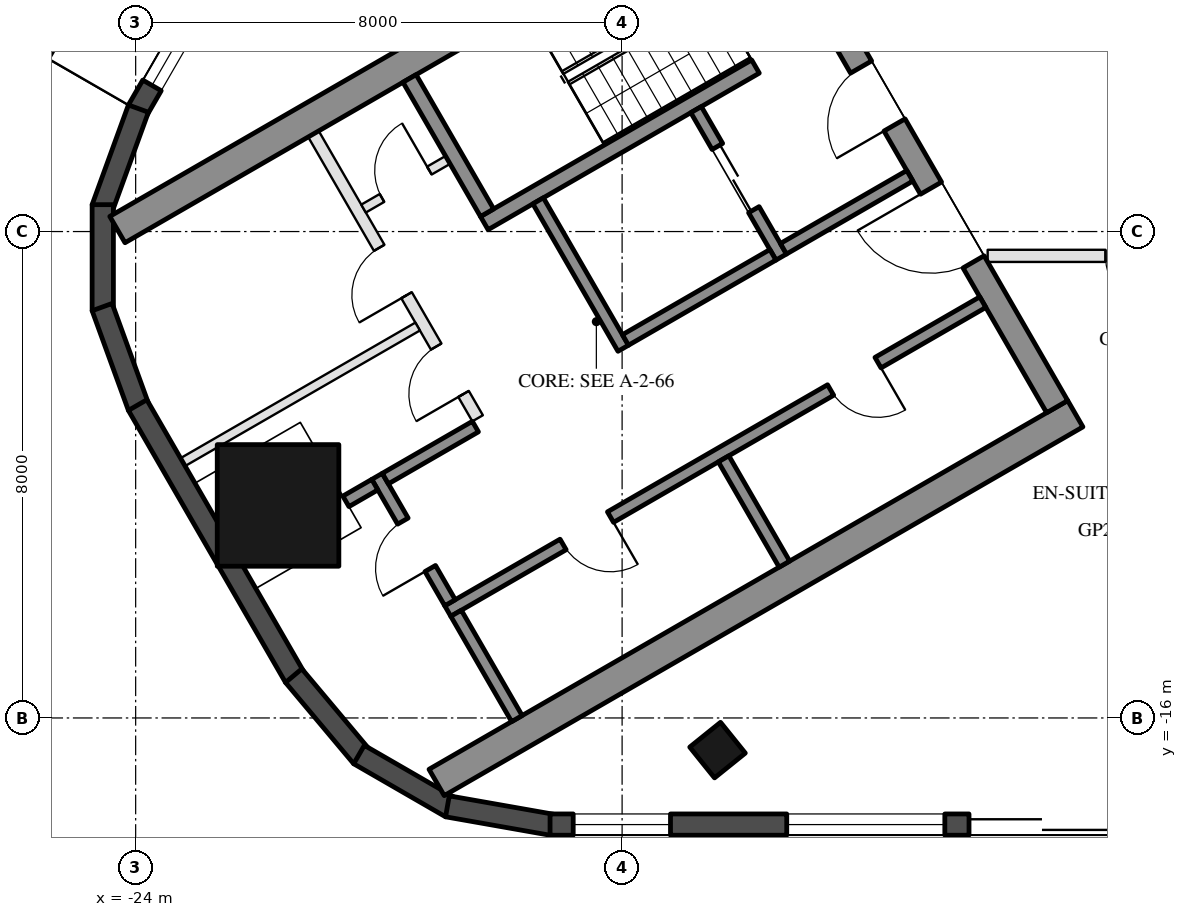
"""IFC4 building model, lengths in metres.
Left out: names, types, materials, properties, quantities, classifications, styles, units other than length and angle.
Written with IfcOpenShell. Run it as: python <this file> out.ifc"""

import sys

from ifc_helpers import new_model, si_unit, direction, frame, frame_2d, origin, origin_2d, place, context, subcontext, project, spatial, rectangle, hollow_rectangle, extrude, boolean, halfspace, element, fill, save


model = new_model("IFC4")
c1 = context("Model", 3, precision=1e-05, world=origin(), true_north=direction((0.0, 1.0)))
c2 = subcontext(c1, "Body", "Model", "MODEL_VIEW")
j1 = project(units=[si_unit("LENGTHUNIT", "METRE"), si_unit("PLANEANGLEUNIT", "RADIAN")], contexts=[c1])
p1 = place(None, origin())
s1 = spatial("IfcSite", under=j1, at=p1, CompositionType="ELEMENT")
p2 = place(p1, origin())
s2 = spatial("IfcBuilding", under=s1, at=p2, CompositionType="ELEMENT")
p3 = place(p2, frame((0.0, 0.0, 287.4)))
s3 = spatial("IfcBuildingStorey", under=s2, at=p3, CompositionType="ELEMENT", Elevation=287.4)
p4 = place(p3, frame((-14.431, -16.529, 0.0), z_axis=(0.121062211455, 0.150389046636, 0.981186565139), x_axis=(-0.992602517882, 0.00920416117, 0.121060005413)))
e1 = element("IfcColumn", 1, at=p4, inside=s3, PredefinedType="COLUMN", context=c2, shape_type="SweptSolid", body=[
    boolean("DIFFERENCE", boolean("DIFFERENCE", extrude(hollow_rectangle(XDim=0.65, YDim=0.65, WallThickness=0.03, at=origin_2d()), origin(), (0.0, 0.0, 1.0), 3.771), halfspace(frame((0.0, 0.0, 0.047), z_axis=(0.0, 0.0, 1.0), x_axis=(1.0, 0.0, 0.0)), True)), halfspace(frame((0.0, 0.0, 3.724), z_axis=(0.0, 0.0, 1.0), x_axis=(1.0, 0.0, 0.0)), False)),
])
p5 = place(p3, frame((-21.658, -12.504, 0.0), z_axis=(0.19033286006, 0.109938628672, 0.975544412268), x_axis=(-0.500170259217, 0.865927082262, 0.0)))
e2 = element("IfcColumn", 2, at=p5, inside=s3, PredefinedType="COLUMN", context=c2, shape_type="SweptSolid", body=[
    boolean("DIFFERENCE", boolean("DIFFERENCE", extrude(hollow_rectangle(XDim=2.0, YDim=2.0, WallThickness=0.05, at=origin_2d()), origin(), (0.0, 0.0, 1.0), 3.793), halfspace(frame((0.0, 0.0, 0.113), z_axis=(0.0, 0.0, 1.0), x_axis=(1.0, 0.0, 0.0)), True)), halfspace(frame((0.0, 0.0, 3.68), z_axis=(0.0, 0.0, 1.0), x_axis=(1.0, 0.0, 0.0)), False)),
])
p6 = place(p3, frame((-22.14, -2.841, 0.0), z_axis=(0.0, 0.0, 1.0), x_axis=(-0.500040506767, -0.866002015928, 0.0)))
e3 = element("IfcWall", 3, at=p6, inside=s3, PredefinedType="SOLIDWALL", context=c2, shape_type="SweptSolid", body=[
    extrude(rectangle(XDim=3.655, YDim=0.35, at=frame_2d((1.827, 0.0))), origin(), (0.0, 0.0, 1.0), 3.55),
])
p7 = place(p6, frame((1.582, 0.0, 0.3)))
e4 = element("IfcOpeningElement", 4, at=p7, cuts=e3, PredefinedType="OPENING", context=c2, shape_type="SweptSolid", body=[
    extrude(rectangle(XDim=1.6, YDim=2.65, at=frame_2d((0.8, 1.325))), frame((0.0, 0.185, 0.0), z_axis=(0.0, -1.0, 0.0), x_axis=(1.0, 0.0, 0.0)), (0.0, 0.0, 1.0), 0.37),
])
for number, where, z_axis, x_axis in (
    (5, (-23.955, -5.978, 0.0), (0.0, 0.0, 1.0), (-0.342, -0.94, 0.0)),
    (6, (-24.541, -7.558, 0.0), (0.0, 0.0, 1.0), (0.0, -1.0, 0.0)),
    (7, (-24.552, -9.242, 0.0), (0.0, 0.0, 1.0), (0.342, -0.94, 0.0)),
):
    element("IfcWall", number, at=place(p3, frame(where, z_axis=z_axis, x_axis=x_axis)), inside=s3, PredefinedType="SOLIDWALL", context=c2, shape_type="SweptSolid", body=[
        extrude(rectangle(XDim=1.745, YDim=0.35, at=frame_2d((0.872, 0.0))), origin(), (0.0, 0.0, 1.0), 3.55),
    ])
p8 = place(p3, frame((-23.968, -10.854, 0.0), z_axis=(0.0, 0.0, 1.0), x_axis=(0.500020983425, -0.866013288659, 0.0)))
e8 = element("IfcWall", 8, at=p8, inside=s3, PredefinedType="SOLIDWALL", context=c2, shape_type="SweptSolid", body=[
    extrude(rectangle(XDim=5.168, YDim=0.35, at=frame_2d((2.584, 0.0))), origin(), (0.0, 0.0, 1.0), 3.55),
])
for number, where, z_axis, x_axis in (
    (9, (-21.401, -15.305, 0.0), (0.0, 0.0, 1.0), (0.643, -0.766, 0.0)),
    (10, (-20.327, -16.602, 0.0), (0.0, 0.0, 1.0), (0.866, -0.5, 0.0)),
    (11, (-18.873, -17.453, 0.0), (0.0, 0.0, 1.0), (0.985, -0.174, 0.0)),
):
    element("IfcWall", number, at=place(p3, frame(where, z_axis=z_axis, x_axis=x_axis)), inside=s3, PredefinedType="SOLIDWALL", context=c2, shape_type="SweptSolid", body=[
        extrude(rectangle(XDim=1.745, YDim=0.35, at=frame_2d((0.872, 0.0))), origin(), (0.0, 0.0, 1.0), 3.55),
    ])
p9 = place(p3, frame((-17.185, -17.754, 0.0), z_axis=(0.0, 0.0, 1.0), x_axis=(1.0, 0.0, 0.0)))
e12 = element("IfcWall", 12, at=p9, inside=s3, PredefinedType="SOLIDWALL", context=c2, shape_type="SweptSolid", body=[
    extrude(rectangle(XDim=10.87, YDim=0.35, at=frame_2d((5.435, 0.0))), origin(), (0.0, 0.0, 1.0), 3.55),
])
p10 = place(p9, frame((0.381, 0.0, 0.3)))
e13 = element("IfcOpeningElement", 13, at=p10, cuts=e12, PredefinedType="OPENING", context=c2, shape_type="SweptSolid", body=[
    extrude(rectangle(XDim=1.6, YDim=2.65, at=frame_2d((0.8, 1.325))), frame((0.0, 0.185, 0.0), z_axis=(0.0, -1.0, 0.0), x_axis=(1.0, 0.0, 0.0)), (0.0, 0.0, 1.0), 0.37),
])
p11 = place(p9, frame((6.89, 0.0, 0.0)))
e14 = element("IfcOpeningElement", 14, at=p11, cuts=e12, PredefinedType="OPENING", context=c2, shape_type="SweptSolid", body=[
    extrude(rectangle(XDim=2.4, YDim=2.4, at=frame_2d((1.2, 1.2))), frame((0.0, 0.185, 0.0), z_axis=(0.0, -1.0, 0.0), x_axis=(1.0, 0.0, 0.0)), (0.0, 0.0, 1.0), 0.37),
])
p12 = place(p9, frame((3.893, 0.0, 0.3)))
e15 = element("IfcOpeningElement", 15, at=p12, cuts=e12, PredefinedType="OPENING", context=c2, shape_type="SweptSolid", body=[
    extrude(rectangle(XDim=2.6, YDim=2.65, at=frame_2d((1.3, 1.325))), frame((0.0, 0.185, 0.0), z_axis=(0.0, -1.0, 0.0), x_axis=(1.0, 0.0, 0.0)), (0.0, 0.0, 1.0), 0.37),
])
for number, where, z_axis, x_axis in (
    (16, (-13.797, -1.903, 0.0), (0.0, 0.0, 1.0), (-0.866, -0.5, 0.0)),
    (17, (-8.547, -10.997, 0.0), (0.0, 0.0, 1.0), (-0.866, -0.5, 0.0)),
):
    element("IfcWall", number, at=place(p3, frame(where, z_axis=z_axis, x_axis=x_axis)), inside=s3, PredefinedType="SHEAR", context=c2, shape_type="SweptSolid", body=[
        extrude(rectangle(XDim=12.129, YDim=0.5, at=frame_2d((6.064, 0.0))), origin(), (0.0, 0.0, 1.0), 3.5),
    ])
p13 = place(p3, frame((-13.845, -2.22, 0.0), z_axis=(0.0, 0.0, 1.0), x_axis=(0.500004234368, -0.866022959057, 0.0)))
e18 = element("IfcWall", 18, at=p13, inside=s3, PredefinedType="SHEAR", context=c2, shape_type="SweptSolid", body=[
    extrude(rectangle(XDim=10.0, YDim=0.4, at=frame_2d((5.0, 0.0))), origin(), (0.0, 0.0, 1.0), 3.5),
])
p14 = place(p13, frame((3.55, 0.0, 0.0)))
e19 = element("IfcOpeningElement", 19, at=p14, cuts=e18, PredefinedType="OPENING", context=c2, shape_type="SweptSolid", body=[
    extrude(rectangle(XDim=1.1, YDim=2.1, at=frame_2d((0.55, 1.05))), frame((0.0, 0.21, 0.0), z_axis=(0.0, -1.0, 0.0), x_axis=(1.0, 0.0, 0.0)), (0.0, 0.0, 1.0), 0.42),
])
p15 = place(p13, frame((5.85, 0.0, 0.0)))
e20 = element("IfcOpeningElement", 20, at=p15, cuts=e18, PredefinedType="OPENING", context=c2, shape_type="SweptSolid", body=[
    extrude(rectangle(XDim=1.4, YDim=2.1, at=frame_2d((0.7, 1.05))), frame((0.0, 0.21, 0.0), z_axis=(0.0, -1.0, 0.0), x_axis=(1.0, 0.0, 0.0)), (0.0, 0.0, 1.0), 0.42),
])
p16 = place(p3, frame((-12.681, -4.636, 0.0), z_axis=(0.0, 0.0, 1.0), x_axis=(-0.866021702275, -0.500006411147, 0.0)))
e21 = element("IfcWall", 21, at=p16, inside=s3, PredefinedType="SHEAR", context=c2, shape_type="SweptSolid", body=[
    extrude(rectangle(XDim=6.45, YDim=0.25, at=frame_2d((3.225, 0.0))), origin(), (0.0, 0.0, 1.0), 3.5),
])
p17 = place(p16, frame((0.3, 0.0, 0.0)))
e22 = element("IfcOpeningElement", 22, at=p17, cuts=e21, PredefinedType="OPENING", context=c2, shape_type="SweptSolid", body=[
    extrude(rectangle(XDim=1.0, YDim=2.1, at=frame_2d((0.5, 1.05))), frame((0.0, 0.135, 0.0), z_axis=(0.0, -1.0, 0.0), x_axis=(1.0, 0.0, 0.0)), (0.0, 0.0, 1.0), 0.27),
])
p18 = place(p3, frame((-19.496, -5.482, 0.0), z_axis=(0.0, 0.0, 1.0), x_axis=(0.499990435942, -0.866030925526, 0.0)))
e23 = element("IfcWall", 23, at=p18, inside=s3, PredefinedType="SHEAR", context=c2, shape_type="SweptSolid", body=[
    extrude(rectangle(XDim=2.55, YDim=0.25, at=frame_2d((1.275, 0.0))), origin(), (0.0, 0.0, 1.0), 3.5),
])
p19 = place(p3, frame((-17.381, -7.495, 0.0), z_axis=(0.0, 0.0, 1.0), x_axis=(0.500011755427, -0.866018616679, 0.0)))
e24 = element("IfcWall", 24, at=p19, inside=s3, PredefinedType="SHEAR", context=c2, shape_type="SweptSolid", body=[
    extrude(rectangle(XDim=2.8, YDim=0.2, at=frame_2d((1.4, 0.0))), origin(), (0.0, 0.0, 1.0), 3.5),
])
p20 = place(p3, frame((-14.783, -5.995, 0.0), z_axis=(0.0, 0.0, 1.0), x_axis=(0.49994636267, -0.866056369097, 0.0)))
e25 = element("IfcWall", 25, at=p20, inside=s3, PredefinedType="SHEAR", context=c2, shape_type="SweptSolid", body=[
    extrude(rectangle(XDim=2.8, YDim=0.2, at=frame_2d((1.4, 0.0))), origin(), (0.0, 0.0, 1.0), 3.5),
])
p21 = place(p20, frame((0.7, 0.0, 0.0)))
e26 = element("IfcOpeningElement", 26, at=p21, cuts=e25, PredefinedType="OPENING", context=c2, shape_type="SweptSolid", body=[
    extrude(rectangle(XDim=1.2, YDim=2.1, at=frame_2d((0.6, 1.05))), frame((0.0, 0.11, 0.0), z_axis=(0.0, -1.0, 0.0), x_axis=(1.0, 0.0, 0.0)), (0.0, 0.0, 1.0), 0.22),
])
p22 = place(p3, frame((-13.52, -8.383, 0.0), z_axis=(0.0, 0.0, 1.0), x_axis=(-0.866034573852, -0.49998411664, 0.0)))
e27 = element("IfcWall", 27, at=p22, inside=s3, PredefinedType="SHEAR", context=c2, shape_type="SweptSolid", body=[
    extrude(rectangle(XDim=2.8, YDim=0.2, at=frame_2d((1.4, 0.0))), origin(), (0.0, 0.0, 1.0), 3.5),
])
p23 = place(p3, frame((-11.268, -7.083, 0.0), z_axis=(0.0, 0.0, 1.0), x_axis=(-0.866050077142, -0.499957262057, 0.0)))
e28 = element("IfcWall", 28, at=p23, inside=s3, PredefinedType="SHEAR", context=c2, shape_type="SweptSolid", body=[
    extrude(rectangle(XDim=2.4, YDim=0.2, at=frame_2d((1.2, 0.0))), origin(), (0.0, 0.0, 1.0), 3.5),
])
p24 = place(p3, frame((-10.068, -9.162, 0.0), z_axis=(0.0, 0.0, 1.0), x_axis=(-0.866032725843, -0.499987317609, 0.0)))
e29 = element("IfcWall", 29, at=p24, inside=s3, PredefinedType="SHEAR", context=c2, shape_type="SweptSolid", body=[
    extrude(rectangle(XDim=10.16, YDim=0.2, at=frame_2d((5.08, 0.0))), origin(), (0.0, 0.0, 1.0), 3.5),
])
p25 = place(p24, frame((1.99, 0.0, 0.0)))
e30 = element("IfcOpeningElement", 30, at=p25, cuts=e29, PredefinedType="OPENING", context=c2, shape_type="SweptSolid", body=[
    extrude(rectangle(XDim=0.9, YDim=2.1, at=frame_2d((0.45, 1.05))), frame((0.0, 0.11, 0.0), z_axis=(0.0, -1.0, 0.0), x_axis=(1.0, 0.0, 0.0)), (0.0, 0.0, 1.0), 0.22),
])
p26 = place(p24, frame((7.07, 0.0, 0.0)))
e31 = element("IfcOpeningElement", 31, at=p26, cuts=e29, PredefinedType="OPENING", context=c2, shape_type="SweptSolid", body=[
    extrude(rectangle(XDim=0.9, YDim=2.1, at=frame_2d((0.45, 1.05))), frame((0.0, 0.11, 0.0), z_axis=(0.0, -1.0, 0.0), x_axis=(1.0, 0.0, 0.0)), (0.0, 0.0, 1.0), 0.22),
])
p27 = place(p3, frame((-20.031, -12.026, 0.0), z_axis=(0.0, 0.0, 1.0), x_axis=(0.500033551112, -0.866006032174, 0.0)))
e32 = element("IfcWall", 32, at=p27, inside=s3, PredefinedType="SHEAR", context=c2, shape_type="SweptSolid", body=[
    extrude(rectangle(XDim=2.4, YDim=0.2, at=frame_2d((1.2, 0.0))), origin(), (0.0, 0.0, 1.0), 3.5),
])
p28 = place(p27, frame((0.85, 0.0, 0.0)))
e33 = element("IfcOpeningElement", 33, at=p28, cuts=e32, PredefinedType="OPENING", context=c2, shape_type="SweptSolid", body=[
    extrude(rectangle(XDim=0.9, YDim=2.1, at=frame_2d((0.45, 1.05))), frame((0.0, 0.11, 0.0), z_axis=(0.0, -1.0, 0.0), x_axis=(1.0, 0.0, 0.0)), (0.0, 0.0, 1.0), 0.22),
])
p29 = place(p3, frame((-18.413, -11.208, 0.0), z_axis=(0.0, 0.0, 1.0), x_axis=(-0.866038183914, -0.499977863513, 0.0)))
e34 = element("IfcWall", 34, at=p29, inside=s3, PredefinedType="SHEAR", context=c2, shape_type="SweptSolid", body=[
    extrude(rectangle(XDim=1.71, YDim=0.2, at=frame_2d((0.855, 0.0))), origin(), (0.0, 0.0, 1.0), 3.5),
])
for number, where, z_axis, x_axis in (
    (35, (-14.331, -11.738, 0.0), (0.0, 0.0, 1.0), (0.5, -0.866, 0.0)),
    (36, (-18.73, -14.278, 0.0), (0.0, 0.0, 1.0), (0.5, -0.866, 0.0)),
):
    element("IfcWall", number, at=place(p3, frame(where, z_axis=z_axis, x_axis=x_axis)), inside=s3, PredefinedType="SHEAR", context=c2, shape_type="SweptSolid", body=[
        extrude(rectangle(XDim=2.0, YDim=0.2, at=frame_2d((1.0, 0.0))), origin(), (0.0, 0.0, 1.0), 3.5),
    ])
p30 = place(p3, frame((-20.067, -12.163, 0.0), z_axis=(0.0, 0.0, 1.0), x_axis=(-0.866044851585, -0.499966313909, 0.0)))
e37 = element("IfcWall", 37, at=p30, inside=s3, PredefinedType="SHEAR", context=c2, shape_type="SweptSolid", body=[
    extrude(rectangle(XDim=0.549, YDim=0.2, at=frame_2d((0.274, 0.0))), origin(), (0.0, 0.0, 1.0), 3.5),
])
p31 = place(p3, frame((-21.076, -6.395, 0.0), z_axis=(0.0, 0.0, 1.0), x_axis=(0.50001468107, -0.866016927499, 0.0)))
e38 = element("IfcWall", 38, at=p31, inside=s3, PredefinedType="PARTITIONING", context=c2, shape_type="SweptSolid", body=[
    extrude(rectangle(XDim=5.4, YDim=0.2, at=frame_2d((2.7, 0.0))), origin(), (0.0, 0.0, 1.0), 3.5),
])
p32 = place(p31, frame((2.163, 0.0, 0.0)))
e39 = element("IfcOpeningElement", 39, at=p32, cuts=e38, PredefinedType="OPENING", context=c2, shape_type="SweptSolid", body=[
    extrude(rectangle(XDim=0.9, YDim=2.1, at=frame_2d((0.45, 1.05))), frame((0.0, 0.11, 0.0), z_axis=(0.0, -1.0, 0.0), x_axis=(1.0, 0.0, 0.0)), (0.0, 0.0, 1.0), 0.22),
])
p33 = place(p31, frame((4.038, 0.0, 0.0)))
e40 = element("IfcOpeningElement", 40, at=p33, cuts=e38, PredefinedType="OPENING", context=c2, shape_type="SweptSolid", body=[
    extrude(rectangle(XDim=0.9, YDim=2.1, at=frame_2d((0.45, 1.05))), frame((0.0, 0.11, 0.0), z_axis=(0.0, -1.0, 0.0), x_axis=(1.0, 0.0, 0.0)), (0.0, 0.0, 1.0), 0.22),
])
p34 = place(p3, frame((-18.866, -6.822, 0.0), z_axis=(0.0, 0.0, 1.0), x_axis=(-0.866028054938, -0.499995408039, 0.0)))
e41 = element("IfcWall", 41, at=p34, inside=s3, PredefinedType="PARTITIONING", context=c2, shape_type="SweptSolid", body=[
    extrude(rectangle(XDim=1.6, YDim=0.15, at=frame_2d((0.8, 0.0))), origin(), (0.0, 0.0, 1.0), 3.5),
])
p35 = place(p34, frame((0.35, 0.0, 0.0)))
e42 = element("IfcOpeningElement", 42, at=p35, cuts=e41, PredefinedType="OPENING", context=c2, shape_type="SweptSolid", body=[
    extrude(rectangle(XDim=0.9, YDim=2.1, at=frame_2d((0.45, 1.05))), frame((0.0, 0.085, 0.0), z_axis=(0.0, -1.0, 0.0), x_axis=(1.0, 0.0, 0.0)), (0.0, 0.0, 1.0), 0.17),
])
p36 = place(p3, frame((-19.363, -9.562, 0.0), z_axis=(0.0, 0.0, 1.0), x_axis=(-0.866024199568, -0.500002085759, 0.0)))
e43 = element("IfcWall", 43, at=p36, inside=s3, PredefinedType="PARTITIONING", context=c2, shape_type="SweptSolid", body=[
    extrude(rectangle(XDim=4.459, YDim=0.15, at=frame_2d((2.229, 0.0))), origin(), (0.0, 0.0, 1.0), 3.5),
])
p37 = place(p3, frame((-5.0, -8.4, 0.0), z_axis=(0.0, 0.0, 1.0), x_axis=(-1.0, 0.0, 0.0)))
e44 = element("IfcWall", 44, at=p37, inside=s3, PredefinedType="PARTITIONING", context=c2, shape_type="SweptSolid", body=[
    extrude(rectangle(XDim=4.988, YDim=0.2, at=frame_2d((2.494, 0.0))), origin(), (0.0, 0.0, 1.0), 3.05),
])
p38 = place(p37, frame((2.05, 0.0, 0.0)))
e45 = element("IfcOpeningElement", 45, at=p38, cuts=e44, PredefinedType="OPENING", context=c2, shape_type="SweptSolid", body=[
    extrude(rectangle(XDim=1.0, YDim=2.1, at=frame_2d((0.5, 1.05))), frame((0.0, 0.11, 0.0), z_axis=(0.0, -1.0, 0.0), x_axis=(1.0, 0.0, 0.0)), (0.0, 0.0, 1.0), 0.22),
])
p39 = place(p10, origin())
e46 = element("IfcWindow", 46, at=p39, inside=s3, PartitioningType="SINGLE_PANEL", PredefinedType="WINDOW", context=c2, shape_type="SweptSolid", body=[
    extrude(rectangle(XDim=1.6, YDim=2.65, at=frame_2d((0.8, 1.325))), frame((0.0, 0.03, 0.0), z_axis=(0.0, -1.0, 0.0), x_axis=(1.0, 0.0, 0.0)), (0.0, 0.0, 1.0), 0.06),
])
fill(e13, e46)
p40 = place(p11, frame((2.4, 0.0, 0.0), z_axis=(0.0, 0.0, 1.0), x_axis=(-1.0, 0.0, 0.0)))
e47 = element("IfcDoor", 47, at=p40, inside=s3, OperationType="SLIDING_TO_LEFT", PredefinedType="DOOR", context=c2, shape_type="SweptSolid", body=[
    extrude(rectangle(XDim=2.4, YDim=2.4, at=frame_2d((1.2, 1.2))), frame((0.0, 0.025, 0.0), z_axis=(0.0, -1.0, 0.0), x_axis=(1.0, 0.0, 0.0)), (0.0, 0.0, 1.0), 0.05),
])
fill(e14, e47)
p41 = place(p12, origin())
e48 = element("IfcWindow", 48, at=p41, inside=s3, PartitioningType="SINGLE_PANEL", PredefinedType="WINDOW", context=c2, shape_type="SweptSolid", body=[
    extrude(rectangle(XDim=2.6, YDim=2.65, at=frame_2d((1.3, 1.325))), frame((0.0, 0.03, 0.0), z_axis=(0.0, -1.0, 0.0), x_axis=(1.0, 0.0, 0.0)), (0.0, 0.0, 1.0), 0.06),
])
fill(e15, e48)
p42 = place(p7, origin())
e49 = element("IfcWindow", 49, at=p42, inside=s3, PartitioningType="SINGLE_PANEL", PredefinedType="WINDOW", context=c2, shape_type="SweptSolid", body=[
    extrude(rectangle(XDim=1.6, YDim=2.65, at=frame_2d((0.8, 1.325))), frame((0.0, 0.03, 0.0), z_axis=(0.0, -1.0, 0.0), x_axis=(1.0, 0.0, 0.0)), (0.0, 0.0, 1.0), 0.06),
])
fill(e4, e49)
p43 = place(p21, origin())
e50 = element("IfcDoor", 50, at=p43, inside=s3, OperationType="DOUBLE_DOOR_SLIDING", PredefinedType="DOOR", context=c2, shape_type="SweptSolid", body=[
    extrude(rectangle(XDim=1.2, YDim=2.1, at=frame_2d((0.6, 1.05))), frame((0.0, 0.025, 0.0), z_axis=(0.0, -1.0, 0.0), x_axis=(1.0, 0.0, 0.0)), (0.0, 0.0, 1.0), 0.05),
])
fill(e26, e50)
p44 = place(p35, frame((0.9, 0.0, 0.0), z_axis=(0.0, 0.0, 1.0), x_axis=(-1.0, 0.0, 0.0)))
e51 = element("IfcDoor", 51, at=p44, inside=s3, OperationType="SINGLE_SWING_RIGHT", PredefinedType="DOOR", context=c2, shape_type="SweptSolid", body=[
    extrude(rectangle(XDim=0.9, YDim=2.1, at=frame_2d((0.45, 1.05))), frame((0.0, 0.025, 0.0), z_axis=(0.0, -1.0, 0.0), x_axis=(1.0, 0.0, 0.0)), (0.0, 0.0, 1.0), 0.05),
])
fill(e42, e51)
p45 = place(p25, origin())
e52 = element("IfcDoor", 52, at=p45, inside=s3, OperationType="SINGLE_SWING_LEFT", PredefinedType="DOOR", context=c2, shape_type="SweptSolid", body=[
    extrude(rectangle(XDim=0.9, YDim=2.1, at=frame_2d((0.45, 1.05))), frame((0.0, 0.025, 0.0), z_axis=(0.0, -1.0, 0.0), x_axis=(1.0, 0.0, 0.0)), (0.0, 0.0, 1.0), 0.05),
])
fill(e30, e52)
p46 = place(p26, origin())
e53 = element("IfcDoor", 53, at=p46, inside=s3, OperationType="SINGLE_SWING_LEFT", PredefinedType="DOOR", context=c2, shape_type="SweptSolid", body=[
    extrude(rectangle(XDim=0.9, YDim=2.1, at=frame_2d((0.45, 1.05))), frame((0.0, 0.025, 0.0), z_axis=(0.0, -1.0, 0.0), x_axis=(1.0, 0.0, 0.0)), (0.0, 0.0, 1.0), 0.05),
])
fill(e31, e53)
p47 = place(p28, frame((0.9, 0.0, 0.0), z_axis=(0.0, 0.0, 1.0), x_axis=(-1.0, 0.0, 0.0)))
e54 = element("IfcDoor", 54, at=p47, inside=s3, OperationType="SINGLE_SWING_LEFT", PredefinedType="DOOR", context=c2, shape_type="SweptSolid", body=[
    extrude(rectangle(XDim=0.9, YDim=2.1, at=frame_2d((0.45, 1.05))), frame((0.0, 0.025, 0.0), z_axis=(0.0, -1.0, 0.0), x_axis=(1.0, 0.0, 0.0)), (0.0, 0.0, 1.0), 0.05),
])
fill(e33, e54)
p48 = place(p32, frame((0.9, 0.0, 0.0), z_axis=(0.0, 0.0, 1.0), x_axis=(-1.0, 0.0, 0.0)))
e55 = element("IfcDoor", 55, at=p48, inside=s3, OperationType="SINGLE_SWING_LEFT", PredefinedType="DOOR", context=c2, shape_type="SweptSolid", body=[
    extrude(rectangle(XDim=0.9, YDim=2.1, at=frame_2d((0.45, 1.05))), frame((0.0, 0.025, 0.0), z_axis=(0.0, -1.0, 0.0), x_axis=(1.0, 0.0, 0.0)), (0.0, 0.0, 1.0), 0.05),
])
fill(e39, e55)
p49 = place(p33, frame((0.9, 0.0, 0.0), z_axis=(0.0, 0.0, 1.0), x_axis=(-1.0, 0.0, 0.0)))
e56 = element("IfcDoor", 56, at=p49, inside=s3, OperationType="SINGLE_SWING_LEFT", PredefinedType="DOOR", context=c2, shape_type="SweptSolid", body=[
    extrude(rectangle(XDim=0.9, YDim=2.1, at=frame_2d((0.45, 1.05))), frame((0.0, 0.025, 0.0), z_axis=(0.0, -1.0, 0.0), x_axis=(1.0, 0.0, 0.0)), (0.0, 0.0, 1.0), 0.05),
])
fill(e40, e56)
p50 = place(p14, frame((1.1, 0.0, 0.0), z_axis=(0.0, 0.0, 1.0), x_axis=(-1.0, 0.0, 0.0)))
e57 = element("IfcDoor", 57, at=p50, inside=s3, OperationType="SINGLE_SWING_LEFT", PredefinedType="DOOR", context=c2, shape_type="SweptSolid", body=[
    extrude(rectangle(XDim=1.1, YDim=2.1, at=frame_2d((0.55, 1.05))), frame((0.0, 0.025, 0.0), z_axis=(0.0, -1.0, 0.0), x_axis=(1.0, 0.0, 0.0)), (0.0, 0.0, 1.0), 0.05),
])
fill(e19, e57)
p51 = place(p15, frame((1.4, 0.0, 0.0), z_axis=(0.0, 0.0, 1.0), x_axis=(-1.0, 0.0, 0.0)))
e58 = element("IfcDoor", 58, at=p51, inside=s3, OperationType="DOUBLE_DOOR_SINGLE_SWING", PredefinedType="DOOR", context=c2, shape_type="SweptSolid", body=[
    extrude(rectangle(XDim=1.4, YDim=2.1, at=frame_2d((0.7, 1.05))), frame((0.0, 0.025, 0.0), z_axis=(0.0, -1.0, 0.0), x_axis=(1.0, 0.0, 0.0)), (0.0, 0.0, 1.0), 0.05),
])
fill(e20, e58)
p52 = place(p17, frame((1.0, 0.0, 0.0), z_axis=(0.0, 0.0, 1.0), x_axis=(-1.0, 0.0, 0.0)))
e59 = element("IfcDoor", 59, at=p52, inside=s3, OperationType="SINGLE_SWING_LEFT", PredefinedType="DOOR", context=c2, shape_type="SweptSolid", body=[
    extrude(rectangle(XDim=1.0, YDim=2.1, at=frame_2d((0.5, 1.05))), frame((0.0, 0.025, 0.0), z_axis=(0.0, -1.0, 0.0), x_axis=(1.0, 0.0, 0.0)), (0.0, 0.0, 1.0), 0.05),
])
fill(e22, e59)
p53 = place(p38, origin())
e60 = element("IfcDoor", 60, at=p53, inside=s3, OperationType="SINGLE_SWING_LEFT", PredefinedType="DOOR", context=c2, shape_type="SweptSolid", body=[
    extrude(rectangle(XDim=1.0, YDim=2.1, at=frame_2d((0.5, 1.05))), frame((0.0, 0.025, 0.0), z_axis=(0.0, -1.0, 0.0), x_axis=(1.0, 0.0, 0.0)), (0.0, 0.0, 1.0), 0.05),
])
fill(e45, e60)
save(model, sys.argv[1])
